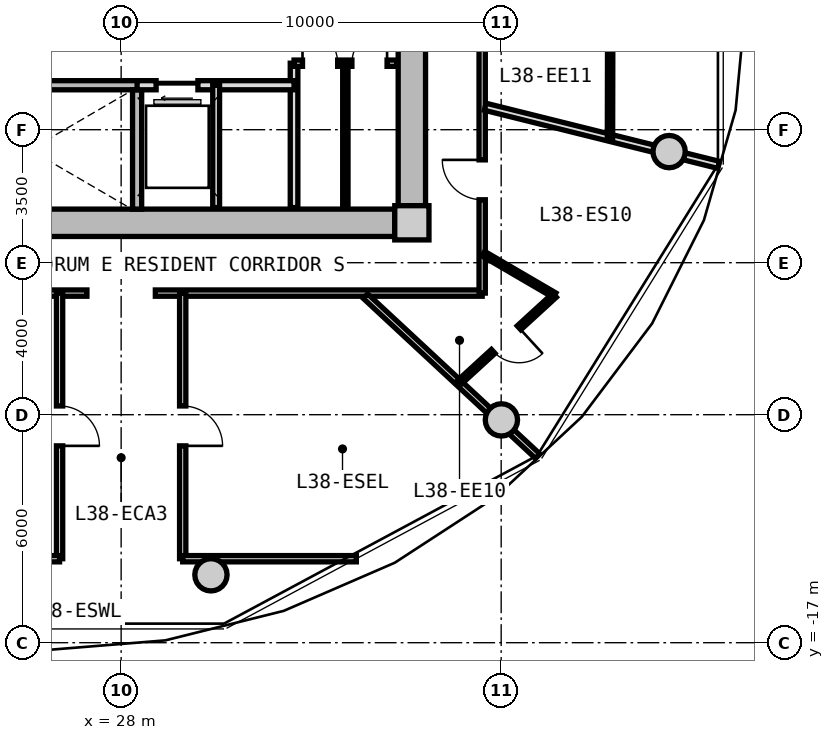
"""IFC4 building model, lengths in metres.
Left out: names, types, materials, properties, quantities, classifications, styles, units other than length and angle.
Written with IfcOpenShell. Run it as: python <this file> out.ifc"""

import sys

from ifc_helpers import new_model, si_unit, direction, frame, frame_2d, origin, origin_2d, place, context, subcontext, project, spatial, rectangle, circle, extrude, source, transform, mapped, element, fill, save


model = new_model("IFC4")
c1 = context("Model", 3, precision=1e-05, world=origin(), true_north=direction((0.0, 1.0)))
c2 = subcontext(c1, "Body", "Model", "MODEL_VIEW")
j1 = project(units=[si_unit("LENGTHUNIT", "METRE"), si_unit("PLANEANGLEUNIT", "RADIAN")], contexts=[c1])
p1 = place(None, origin())
s1 = spatial("IfcSite", under=j1, at=p1, CompositionType="ELEMENT")
p2 = place(p1, origin())
s2 = spatial("IfcBuilding", under=s1, at=p2, CompositionType="ELEMENT")
p3 = place(p2, frame((0.0, 0.0, 123.7)))
s3 = spatial("IfcBuildingStorey", under=s2, at=p3, CompositionType="ELEMENT", Elevation=123.7)
m1 = source(origin(), c2, "Body", "SweptSolid", [
    extrude(rectangle(XDim=0.9, YDim=0.9, at=origin_2d()), origin(), (0.0, 0.0, 1.0), 3.05),
])
p4 = place(p3, frame((35.65, -5.95, 0.0), z_axis=(0.0, 0.0, 1.0), x_axis=(1.0, 0.0, 0.0)))
e1 = element("IfcColumn", 1, at=p4, inside=s3, PredefinedType="COLUMN", context=c2, shape_type="MappedRepresentation", body=[
    mapped(m1, transform((0.0, 0.0, 0.0), x_axis=(1.0, 0.0, 0.0), y_axis=(0.0, 1.0, 0.0), z_axis=(0.0, 0.0, 1.0), scale=1.0)),
])
m2 = source(origin(), c2, "Body", "SweptSolid", [
    extrude(rectangle(XDim=14.4, YDim=0.72, at=frame_2d((7.2, 0.0))), origin(), (0.0, 0.0, 1.0), 2.79),
])
p5 = place(p3, frame((35.2, -5.95, 0.0), z_axis=(0.0, 0.0, 1.0), x_axis=(-1.0, 0.0, 0.0)))
e2 = element("IfcWall", 2, at=p5, inside=s3, PredefinedType="SHEAR", context=c2, shape_type="MappedRepresentation", body=[
    mapped(m2, transform((0.0, 0.0, 0.0), x_axis=(1.0, 0.0, 0.0), y_axis=(0.0, 1.0, 0.0), z_axis=(0.0, 0.0, 1.0), scale=1.0)),
])
m3 = source(origin(), c2, "Body", "SweptSolid", [
    extrude(rectangle(XDim=11.0, YDim=0.72, at=frame_2d((5.5, 0.0))), origin(), (0.0, 0.0, 1.0), 2.79),
])
p6 = place(p3, frame((35.65, 5.5, 0.0), z_axis=(0.0, 0.0, 1.0), x_axis=(0.0, -1.0, 0.0)))
e3 = element("IfcWall", 3, at=p6, inside=s3, PredefinedType="SHEAR", context=c2, shape_type="MappedRepresentation", body=[
    mapped(m3, transform((0.0, 0.0, 0.0), x_axis=(1.0, 0.0, 0.0), y_axis=(0.0, 1.0, 0.0), z_axis=(0.0, 0.0, 1.0), scale=1.0)),
])
p7 = place(p6, frame((5.65, 0.0, 0.0)))
e4 = element("IfcOpeningElement", 4, at=p7, cuts=e3, PredefinedType="OPENING", context=c2, shape_type="SweptSolid", body=[
    extrude(rectangle(XDim=1.2, YDim=2.15, at=frame_2d((0.6, 1.075))), frame((0.0, 0.37, 0.0), z_axis=(0.0, -1.0, 0.0), x_axis=(1.0, 0.0, 0.0)), (0.0, 0.0, 1.0), 0.74),
])
m4 = source(origin(), c2, "Body", "SweptSolid", [
    extrude(circle(Radius=0.425, at=origin_2d()), origin(), (0.0, 0.0, 1.0), 3.05),
])
for number, where, z_axis, x_axis in (
    (5, (30.363, -15.213, 0.0), (0.0, 0.0, 1.0), (1.0, 0.0, 0.0)),
    (6, (38.006, -11.137, 0.0), (0.0, 0.0, 1.0), (1.0, 0.0, 0.0)),
    (7, (42.419, -4.076, 0.0), (0.0, 0.0, 1.0), (1.0, 0.0, 0.0)),
):
    element("IfcColumn", number, at=place(p3, frame(where, z_axis=z_axis, x_axis=x_axis)), inside=s3, PredefinedType="COLUMN", context=c2, shape_type="MappedRepresentation", body=[
        mapped(m4, transform((0.0, 0.0, 0.0), x_axis=(1.0, 0.0, 0.0), y_axis=(0.0, 1.0, 0.0), z_axis=(0.0, 0.0, 1.0), scale=1.0)),
    ])
m5 = source(origin(), c2, "Body", "SweptSolid", [
    extrude(rectangle(XDim=7.83, YDim=0.24, at=frame_2d((3.915, 0.0))), origin(), (0.0, 0.0, 1.0), 2.79),
])
p8 = place(p3, frame((20.71, -2.33, 0.0), z_axis=(0.0, 0.0, 1.0), x_axis=(1.0, 0.0, 0.0)))
e8 = element("IfcWall", 8, at=p8, inside=s3, PredefinedType="PARTITIONING", context=c2, shape_type="MappedRepresentation", body=[
    mapped(m5, transform((0.0, 0.0, 0.0), x_axis=(1.0, 0.0, 0.0), y_axis=(0.0, 1.0, 0.0), z_axis=(0.0, 0.0, 1.0), scale=1.0)),
])
p9 = place(p8, frame((0.95, 0.0, 0.0)))
e9 = element("IfcOpeningElement", 9, at=p9, cuts=e8, PredefinedType="OPENING", context=c2, shape_type="SweptSolid", body=[
    extrude(rectangle(XDim=1.1, YDim=2.15, at=frame_2d((0.55, 1.075))), frame((0.0, 0.13, 0.0), z_axis=(0.0, -1.0, 0.0), x_axis=(1.0, 0.0, 0.0)), (0.0, 0.0, 1.0), 0.26),
])
m6 = source(origin(), c2, "Body", "SweptSolid", [
    extrude(rectangle(XDim=3.14, YDim=0.24, at=frame_2d((1.57, 0.0))), origin(), (0.0, 0.0, 1.0), 2.79),
])
p10 = place(p3, frame((28.42, -5.59, 0.0), z_axis=(0.0, 0.0, 1.0), x_axis=(0.0, 1.0, 0.0)))
e10 = element("IfcWall", 10, at=p10, inside=s3, PredefinedType="PARTITIONING", context=c2, shape_type="MappedRepresentation", body=[
    mapped(m6, transform((0.0, 0.0, 0.0), x_axis=(1.0, 0.0, 0.0), y_axis=(0.0, 1.0, 0.0), z_axis=(0.0, 0.0, 1.0), scale=1.0)),
])
m7 = source(origin(), c2, "Body", "SweptSolid", [
    extrude(rectangle(XDim=3.8, YDim=0.2, at=frame_2d((1.9, 0.0))), origin(), (0.0, 0.0, 1.0), 2.775),
])
p11 = place(p3, frame((32.55, -5.55, 0.0), z_axis=(0.0, 0.0, 1.0), x_axis=(0.0, 1.0, 0.0)))
e11 = element("IfcWall", 11, at=p11, inside=s3, PredefinedType="PARTITIONING", context=c2, shape_type="MappedRepresentation", body=[
    mapped(m7, transform((0.0, 0.0, 0.0), x_axis=(1.0, 0.0, 0.0), y_axis=(0.0, 1.0, 0.0), z_axis=(0.0, 0.0, 1.0), scale=1.0)),
])
m8 = source(origin(), c2, "Body", "SweptSolid", [
    extrude(rectangle(XDim=4.13, YDim=0.24, at=frame_2d((2.065, 0.0))), origin(), (0.0, 0.0, 1.0), 2.775),
])
p12 = place(p3, frame((28.42, -2.33, 0.0), z_axis=(0.0, 0.0, 1.0), x_axis=(1.0, 0.0, 0.0)))
e12 = element("IfcWall", 12, at=p12, inside=s3, PredefinedType="PARTITIONING", context=c2, shape_type="MappedRepresentation", body=[
    mapped(m8, transform((0.0, 0.0, 0.0), x_axis=(1.0, 0.0, 0.0), y_axis=(0.0, 1.0, 0.0), z_axis=(0.0, 0.0, 1.0), scale=1.0)),
])
p13 = place(p12, frame((0.5, 0.0, 0.0)))
e13 = element("IfcOpeningElement", 13, at=p13, cuts=e12, PredefinedType="OPENING", context=c2, shape_type="SweptSolid", body=[
    extrude(rectangle(XDim=1.1, YDim=2.2, at=frame_2d((0.55, 1.1))), frame((0.0, 0.13, 0.0), z_axis=(0.0, -1.0, 0.0), x_axis=(1.0, 0.0, 0.0)), (0.0, 0.0, 1.0), 0.26),
])
m9 = source(origin(), c2, "Body", "SweptSolid", [
    extrude(rectangle(XDim=3.22, YDim=0.18, at=frame_2d((1.61, 0.0))), origin(), (0.0, 0.0, 1.0), 2.775),
])
p14 = place(p3, frame((30.5, -5.55, 0.0), z_axis=(0.0, 0.0, 1.0), x_axis=(0.0, 1.0, 0.0)))
e14 = element("IfcWall", 14, at=p14, inside=s3, PredefinedType="PARTITIONING", context=c2, shape_type="MappedRepresentation", body=[
    mapped(m9, transform((0.0, 0.0, 0.0), x_axis=(1.0, 0.0, 0.0), y_axis=(0.0, 1.0, 0.0), z_axis=(0.0, 0.0, 1.0), scale=1.0)),
])
m10 = source(origin(), c2, "Body", "SweptSolid", [
    extrude(rectangle(XDim=2.7, YDim=0.165, at=frame_2d((1.35, 0.0))), origin(), (0.0, 0.0, 1.0), 2.775),
])
p15 = place(p3, frame((32.55, -1.75, 0.0), z_axis=(0.0, 0.0, 1.0), x_axis=(1.0, 0.0, 0.0)))
e15 = element("IfcWall", 15, at=p15, inside=s3, PredefinedType="PARTITIONING", context=c2, shape_type="MappedRepresentation", body=[
    mapped(m10, transform((0.0, 0.0, 0.0), x_axis=(1.0, 0.0, 0.0), y_axis=(0.0, 1.0, 0.0), z_axis=(0.0, 0.0, 1.0), scale=1.0)),
])
p16 = place(p15, frame((0.222, 0.0, 0.0)))
e16 = element("IfcOpeningElement", 16, at=p16, cuts=e15, PredefinedType="OPENING", context=c2, shape_type="SweptSolid", body=[
    extrude(rectangle(XDim=0.925, YDim=2.1, at=frame_2d((0.462, 1.05))), frame((0.0, 0.093, 0.0), z_axis=(0.0, -1.0, 0.0), x_axis=(1.0, 0.0, 0.0)), (0.0, 0.0, 1.0), 0.185),
])
p17 = place(p15, frame((1.522, 0.0, 0.0)))
e17 = element("IfcOpeningElement", 17, at=p17, cuts=e15, PredefinedType="OPENING", context=c2, shape_type="SweptSolid", body=[
    extrude(rectangle(XDim=0.925, YDim=2.1, at=frame_2d((0.462, 1.05))), frame((0.0, 0.093, 0.0), z_axis=(0.0, -1.0, 0.0), x_axis=(1.0, 0.0, 0.0)), (0.0, 0.0, 1.0), 0.185),
])
m11 = source(origin(), c2, "Body", "SweptSolid", [
    extrude(rectangle(XDim=3.8, YDim=0.14, at=frame_2d((1.9, 0.0))), origin(), (0.0, 0.0, 1.0), 2.775),
])
p18 = place(p3, frame((33.9, -5.55, 0.0), z_axis=(0.0, 0.0, 1.0), x_axis=(0.0, 1.0, 0.0)))
e18 = element("IfcWall", 18, at=p18, inside=s3, PredefinedType="PARTITIONING", context=c2, shape_type="MappedRepresentation", body=[
    mapped(m11, transform((0.0, 0.0, 0.0), x_axis=(1.0, 0.0, 0.0), y_axis=(0.0, 1.0, 0.0), z_axis=(0.0, 0.0, 1.0), scale=1.0)),
])
m12 = source(origin(), c2, "Body", "SweptSolid", [
    extrude(rectangle(XDim=8.6, YDim=0.165, at=frame_2d((4.3, 0.0))), origin(), (0.0, 0.0, 1.0), 2.775),
])
p19 = place(p3, frame((37.5, -7.8, 0.0), z_axis=(0.0, 0.0, 1.0), x_axis=(-1.0, 0.0, 0.0)))
e19 = element("IfcWall", 19, at=p19, inside=s3, PredefinedType="PARTITIONING", context=c2, shape_type="MappedRepresentation", body=[
    mapped(m12, transform((0.0, 0.0, 0.0), x_axis=(1.0, 0.0, 0.0), y_axis=(0.0, 1.0, 0.0), z_axis=(0.0, 0.0, 1.0), scale=1.0)),
])
p20 = place(p3, frame((27.1, -7.8, 0.0), z_axis=(0.0, 0.0, 1.0), x_axis=(-1.0, 0.0, 0.0)))
e20 = element("IfcWall", 20, at=p20, inside=s3, PredefinedType="PARTITIONING", context=c2, shape_type="MappedRepresentation", body=[
    mapped(m12, transform((0.0, 0.0, 0.0), x_axis=(1.0, 0.0, 0.0), y_axis=(0.0, 1.0, 0.0), z_axis=(0.0, 0.0, 1.0), scale=1.0)),
])
p21 = place(p20, frame((5.375, 0.0, 0.0)))
e21 = element("IfcOpeningElement", 21, at=p21, cuts=e20, PredefinedType="OPENING", context=c2, shape_type="SweptSolid", body=[
    extrude(rectangle(XDim=1.05, YDim=2.15, at=frame_2d((0.525, 1.075))), frame((0.0, 0.093, 0.0), z_axis=(0.0, -1.0, 0.0), x_axis=(1.0, 0.0, 0.0)), (0.0, 0.0, 1.0), 0.185),
])
m13 = source(origin(), c2, "Body", "SweptSolid", [
    extrude(rectangle(XDim=15.6, YDim=0.165, at=frame_2d((7.8, 0.0))), origin(), (0.0, 0.0, 1.0), 2.775),
])
p22 = place(p3, frame((37.5, 7.8, 0.0), z_axis=(0.0, 0.0, 1.0), x_axis=(0.0, -1.0, 0.0)))
e22 = element("IfcWall", 22, at=p22, inside=s3, PredefinedType="PARTITIONING", context=c2, shape_type="MappedRepresentation", body=[
    mapped(m13, transform((0.0, 0.0, 0.0), x_axis=(1.0, 0.0, 0.0), y_axis=(0.0, 1.0, 0.0), z_axis=(0.0, 0.0, 1.0), scale=1.0)),
])
p23 = place(p22, frame((12.094, 0.0, 0.0)))
e23 = element("IfcOpeningElement", 23, at=p23, cuts=e22, PredefinedType="OPENING", context=c2, shape_type="SweptSolid", body=[
    extrude(rectangle(XDim=1.05, YDim=2.15, at=frame_2d((0.525, 1.075))), frame((0.0, 0.093, 0.0), z_axis=(0.0, -1.0, 0.0), x_axis=(1.0, 0.0, 0.0)), (0.0, 0.0, 1.0), 0.185),
])
p24 = place(p22, frame((5.971, 0.0, 0.0)))
e24 = element("IfcOpeningElement", 24, at=p24, cuts=e22, PredefinedType="OPENING", context=c2, shape_type="SweptSolid", body=[
    extrude(rectangle(XDim=1.05, YDim=2.15, at=frame_2d((0.525, 1.075))), frame((0.0, 0.093, 0.0), z_axis=(0.0, -1.0, 0.0), x_axis=(1.0, 0.0, 0.0)), (0.0, 0.0, 1.0), 0.185),
])
p25 = place(p22, frame((3.324, 0.0, 0.0)))
e25 = element("IfcOpeningElement", 25, at=p25, cuts=e22, PredefinedType="OPENING", context=c2, shape_type="SweptSolid", body=[
    extrude(rectangle(XDim=0.92, YDim=2.1, at=frame_2d((0.46, 1.05))), frame((0.0, 0.093, 0.0), z_axis=(0.0, -1.0, 0.0), x_axis=(1.0, 0.0, 0.0)), (0.0, 0.0, 1.0), 0.185),
])
m14 = source(origin(), c2, "Body", "SweptSolid", [
    extrude(rectangle(XDim=6.187, YDim=0.165, at=frame_2d((3.093, 0.0))), origin(), (0.0, 0.0, 1.0), 2.275),
])
p26 = place(p3, frame((34.429, -7.88, 0.0), z_axis=(0.0, 0.0, 1.0), x_axis=(0.732501077882, -0.680765870841, 0.0)))
e26 = element("IfcWall", 26, at=p26, inside=s3, PredefinedType="PARTITIONING", context=c2, shape_type="MappedRepresentation", body=[
    mapped(m14, transform((0.0, 0.0, 0.0), x_axis=(1.0, 0.0, 0.0), y_axis=(0.0, 1.0, 0.0), z_axis=(0.0, 0.0, 1.0), scale=1.0)),
])
m15 = source(origin(), c2, "Body", "SweptSolid", [
    extrude(rectangle(XDim=6.99, YDim=0.165, at=frame_2d((3.495, 0.0))), origin(), (0.0, 0.0, 1.0), 2.775),
])
p27 = place(p3, frame((26.38, -14.79, 0.0), z_axis=(0.0, 0.0, 1.0), x_axis=(0.0, 1.0, 0.0)))
e27 = element("IfcWall", 27, at=p27, inside=s3, PredefinedType="PARTITIONING", context=c2, shape_type="MappedRepresentation", body=[
    mapped(m15, transform((0.0, 0.0, 0.0), x_axis=(1.0, 0.0, 0.0), y_axis=(0.0, 1.0, 0.0), z_axis=(0.0, 0.0, 1.0), scale=1.0)),
])
p28 = place(p27, frame((2.97, 0.0, 0.0)))
e28 = element("IfcOpeningElement", 28, at=p28, cuts=e27, PredefinedType="OPENING", context=c2, shape_type="SweptSolid", body=[
    extrude(rectangle(XDim=1.05, YDim=2.15, at=frame_2d((0.525, 1.075))), frame((0.0, 0.093, 0.0), z_axis=(0.0, -1.0, 0.0), x_axis=(1.0, 0.0, 0.0)), (0.0, 0.0, 1.0), 0.185),
])
m16 = source(origin(), c2, "Body", "SweptSolid", [
    extrude(rectangle(XDim=4.851, YDim=0.165, at=frame_2d((2.425, 0.0))), origin(), (0.0, 0.0, 1.0), 2.775),
])
p29 = place(p3, frame((21.529, -14.79, 0.0), z_axis=(0.0, 0.0, 1.0), x_axis=(1.0, 0.0, 0.0)))
e29 = element("IfcWall", 29, at=p29, inside=s3, PredefinedType="PARTITIONING", context=c2, shape_type="MappedRepresentation", body=[
    mapped(m16, transform((0.0, 0.0, 0.0), x_axis=(1.0, 0.0, 0.0), y_axis=(0.0, 1.0, 0.0), z_axis=(0.0, 0.0, 1.0), scale=1.0)),
])
m17 = source(origin(), c2, "Body", "SweptSolid", [
    extrude(rectangle(XDim=6.99, YDim=0.165, at=frame_2d((3.495, 0.0))), origin(), (0.0, 0.0, 1.0), 2.275),
])
p30 = place(p3, frame((29.62, -14.79, 0.0), z_axis=(0.0, 0.0, 1.0), x_axis=(0.0, 1.0, 0.0)))
e30 = element("IfcWall", 30, at=p30, inside=s3, PredefinedType="PARTITIONING", context=c2, shape_type="MappedRepresentation", body=[
    mapped(m17, transform((0.0, 0.0, 0.0), x_axis=(1.0, 0.0, 0.0), y_axis=(0.0, 1.0, 0.0), z_axis=(0.0, 0.0, 1.0), scale=1.0)),
])
p31 = place(p30, frame((2.97, 0.0, 0.0)))
e31 = element("IfcOpeningElement", 31, at=p31, cuts=e30, PredefinedType="OPENING", context=c2, shape_type="SweptSolid", body=[
    extrude(rectangle(XDim=1.05, YDim=2.15, at=frame_2d((0.525, 1.075))), frame((0.0, 0.093, 0.0), z_axis=(0.0, -1.0, 0.0), x_axis=(1.0, 0.0, 0.0)), (0.0, 0.0, 1.0), 0.185),
])
m18 = source(origin(), c2, "Body", "SweptSolid", [
    extrude(rectangle(XDim=4.569, YDim=0.165, at=frame_2d((2.285, 0.0))), origin(), (0.0, 0.0, 1.0), 2.775),
])
p32 = place(p3, frame((29.62, -14.79, 0.0), z_axis=(0.0, 0.0, 1.0), x_axis=(1.0, 0.0, 0.0)))
e32 = element("IfcWall", 32, at=p32, inside=s3, PredefinedType="PARTITIONING", context=c2, shape_type="MappedRepresentation", body=[
    mapped(m18, transform((0.0, 0.0, 0.0), x_axis=(1.0, 0.0, 0.0), y_axis=(0.0, 1.0, 0.0), z_axis=(0.0, 0.0, 1.0), scale=1.0)),
])
m19 = source(origin(), c2, "Body", "SweptSolid", [
    extrude(rectangle(XDim=6.331, YDim=0.19, at=frame_2d((3.165, 0.0))), origin(), (0.0, 0.0, 1.0), 2.275),
])
p33 = place(p3, frame((37.58, -2.896, 0.0), z_axis=(0.0, 0.0, 1.0), x_axis=(0.97036440661, -0.241646267062, 0.0)))
e33 = element("IfcWall", 33, at=p33, inside=s3, PredefinedType="PARTITIONING", context=c2, shape_type="MappedRepresentation", body=[
    mapped(m19, transform((0.0, 0.0, 0.0), x_axis=(1.0, 0.0, 0.0), y_axis=(0.0, 1.0, 0.0), z_axis=(0.0, 0.0, 1.0), scale=1.0)),
])
m20 = source(origin(), c2, "Body", "SweptSolid", [
    extrude(rectangle(XDim=2.172, YDim=0.14, at=frame_2d((1.086, 0.0))), origin(), (0.0, 0.0, 1.0), 2.775),
])
p34 = place(p3, frame((37.53, -6.762, 0.0), z_axis=(0.0, 0.0, 1.0), x_axis=(0.863562702562, -0.504241468688, 0.0)))
e34 = element("IfcWall", 34, at=p34, inside=s3, PredefinedType="PARTITIONING", context=c2, shape_type="MappedRepresentation", body=[
    mapped(m20, transform((0.0, 0.0, 0.0), x_axis=(1.0, 0.0, 0.0), y_axis=(0.0, 1.0, 0.0), z_axis=(0.0, 0.0, 1.0), scale=1.0)),
])
m21 = source(origin(), c2, "Body", "SweptSolid", [
    extrude(rectangle(XDim=3.457, YDim=0.14, at=frame_2d((1.729, 0.0))), origin(), (0.0, 0.0, 1.0), 2.775),
])
p35 = place(p3, frame((39.405, -7.857, 0.0), z_axis=(0.0, 0.0, 1.0), x_axis=(-0.737567375492, -0.675273549467, 0.0)))
e35 = element("IfcWall", 35, at=p35, inside=s3, PredefinedType="PARTITIONING", context=c2, shape_type="MappedRepresentation", body=[
    mapped(m21, transform((0.0, 0.0, 0.0), x_axis=(1.0, 0.0, 0.0), y_axis=(0.0, 1.0, 0.0), z_axis=(0.0, 0.0, 1.0), scale=1.0)),
])
p36 = place(p35, frame((1.268, 0.0, 0.0)))
e36 = element("IfcOpeningElement", 36, at=p36, cuts=e35, PredefinedType="OPENING", context=c2, shape_type="SweptSolid", body=[
    extrude(rectangle(XDim=0.92, YDim=2.1, at=frame_2d((0.46, 1.05))), frame((0.0, 0.08, 0.0), z_axis=(0.0, -1.0, 0.0), x_axis=(1.0, 0.0, 0.0)), (0.0, 0.0, 1.0), 0.16),
])
m22 = source(origin(), c2, "Body", "SweptSolid", [
    extrude(rectangle(XDim=3.247, YDim=0.14, at=frame_2d((1.624, 0.0))), origin(), (0.0, 0.0, 1.0), 2.775),
])
p37 = place(p3, frame((40.87, -0.487, 0.0), z_axis=(0.0, 0.0, 1.0), x_axis=(-0.002105100215, -0.999997784274, 0.0)))
e37 = element("IfcWall", 37, at=p37, inside=s3, PredefinedType="PARTITIONING", context=c2, shape_type="MappedRepresentation", body=[
    mapped(m22, transform((0.0, 0.0, 0.0), x_axis=(1.0, 0.0, 0.0), y_axis=(0.0, 1.0, 0.0), z_axis=(0.0, 0.0, 1.0), scale=1.0)),
])
m23 = source(origin(), c2, "Body", "SweptSolid", [
    extrude(rectangle(XDim=1.1, YDim=2.2, at=frame_2d((0.55, 1.1))), frame((0.0, 0.025, 0.0), z_axis=(0.0, -1.0, 0.0), x_axis=(1.0, 0.0, 0.0)), (0.0, 0.0, 1.0), 0.05),
])
p38 = place(p13, frame((1.1, 0.0, 0.0), z_axis=(0.0, 0.0, 1.0), x_axis=(-1.0, 0.0, 0.0)))
e38 = element("IfcDoor", 38, at=p38, inside=s3, OperationType="SLIDING_TO_LEFT", PredefinedType="DOOR", context=c2, shape_type="MappedRepresentation", body=[
    mapped(m23, transform((0.0, 0.0, 0.0), x_axis=(1.0, 0.0, 0.0), y_axis=(0.0, 1.0, 0.0), z_axis=(0.0, 0.0, 1.0), scale=1.0)),
])
fill(e13, e38)
m24 = source(origin(), c2, "Body", "SweptSolid", [
    extrude(rectangle(XDim=0.925, YDim=2.1, at=frame_2d((0.462, 1.05))), frame((0.0, 0.025, 0.0), z_axis=(0.0, -1.0, 0.0), x_axis=(1.0, 0.0, 0.0)), (0.0, 0.0, 1.0), 0.05),
])
p39 = place(p16, origin())
e39 = element("IfcDoor", 39, at=p39, inside=s3, OperationType="SINGLE_SWING_LEFT", PredefinedType="DOOR", context=c2, shape_type="MappedRepresentation", body=[
    mapped(m24, transform((0.0, 0.0, 0.0), x_axis=(1.0, 0.0, 0.0), y_axis=(0.0, 1.0, 0.0), z_axis=(0.0, 0.0, 1.0), scale=1.0)),
])
fill(e16, e39)
p40 = place(p17, origin())
e40 = element("IfcDoor", 40, at=p40, inside=s3, OperationType="SINGLE_SWING_RIGHT", PredefinedType="DOOR", context=c2, shape_type="MappedRepresentation", body=[
    mapped(m24, transform((0.0, 0.0, 0.0), x_axis=(1.0, 0.0, 0.0), y_axis=(0.0, 1.0, 0.0), z_axis=(0.0, 0.0, 1.0), scale=1.0)),
])
fill(e17, e40)
m25 = source(origin(), c2, "Body", "SweptSolid", [
    extrude(rectangle(XDim=1.05, YDim=2.15, at=frame_2d((0.525, 1.075))), frame((0.0, 0.025, 0.0), z_axis=(0.0, -1.0, 0.0), x_axis=(1.0, 0.0, 0.0)), (0.0, 0.0, 1.0), 0.05),
])
p41 = place(p28, frame((1.05, 0.0, 0.0), z_axis=(0.0, 0.0, 1.0), x_axis=(-1.0, 0.0, 0.0)))
e41 = element("IfcDoor", 41, at=p41, inside=s3, OperationType="SINGLE_SWING_RIGHT", PredefinedType="DOOR", context=c2, shape_type="MappedRepresentation", body=[
    mapped(m25, transform((0.0, 0.0, 0.0), x_axis=(1.0, 0.0, 0.0), y_axis=(0.0, 1.0, 0.0), z_axis=(0.0, 0.0, 1.0), scale=1.0)),
])
fill(e28, e41)
p42 = place(p31, frame((1.05, 0.0, 0.0), z_axis=(0.0, 0.0, 1.0), x_axis=(-1.0, 0.0, 0.0)))
e42 = element("IfcDoor", 42, at=p42, inside=s3, OperationType="SINGLE_SWING_RIGHT", PredefinedType="DOOR", context=c2, shape_type="MappedRepresentation", body=[
    mapped(m25, transform((0.0, 0.0, 0.0), x_axis=(1.0, 0.0, 0.0), y_axis=(0.0, 1.0, 0.0), z_axis=(0.0, 0.0, 1.0), scale=1.0)),
])
fill(e31, e42)
p43 = place(p23, frame((1.05, 0.0, 0.0), z_axis=(0.0, 0.0, 1.0), x_axis=(-1.0, 0.0, 0.0)))
e43 = element("IfcDoor", 43, at=p43, inside=s3, OperationType="SINGLE_SWING_RIGHT", PredefinedType="DOOR", context=c2, shape_type="MappedRepresentation", body=[
    mapped(m25, transform((0.0, 0.0, 0.0), x_axis=(1.0, 0.0, 0.0), y_axis=(0.0, 1.0, 0.0), z_axis=(0.0, 0.0, 1.0), scale=1.0)),
])
fill(e23, e43)
m26 = source(origin(), c2, "Body", "SweptSolid", [
    extrude(rectangle(XDim=0.92, YDim=2.1, at=frame_2d((0.46, 1.05))), frame((0.0, 0.025, 0.0), z_axis=(0.0, -1.0, 0.0), x_axis=(1.0, 0.0, 0.0)), (0.0, 0.0, 1.0), 0.05),
])
p44 = place(p36, origin())
e44 = element("IfcDoor", 44, at=p44, inside=s3, OperationType="SINGLE_SWING_LEFT", PredefinedType="DOOR", context=c2, shape_type="MappedRepresentation", body=[
    mapped(m26, transform((0.0, 0.0, 0.0), x_axis=(1.0, 0.0, 0.0), y_axis=(0.0, 1.0, 0.0), z_axis=(0.0, 0.0, 1.0), scale=1.0)),
])
fill(e36, e44)
save(model, sys.argv[1])
